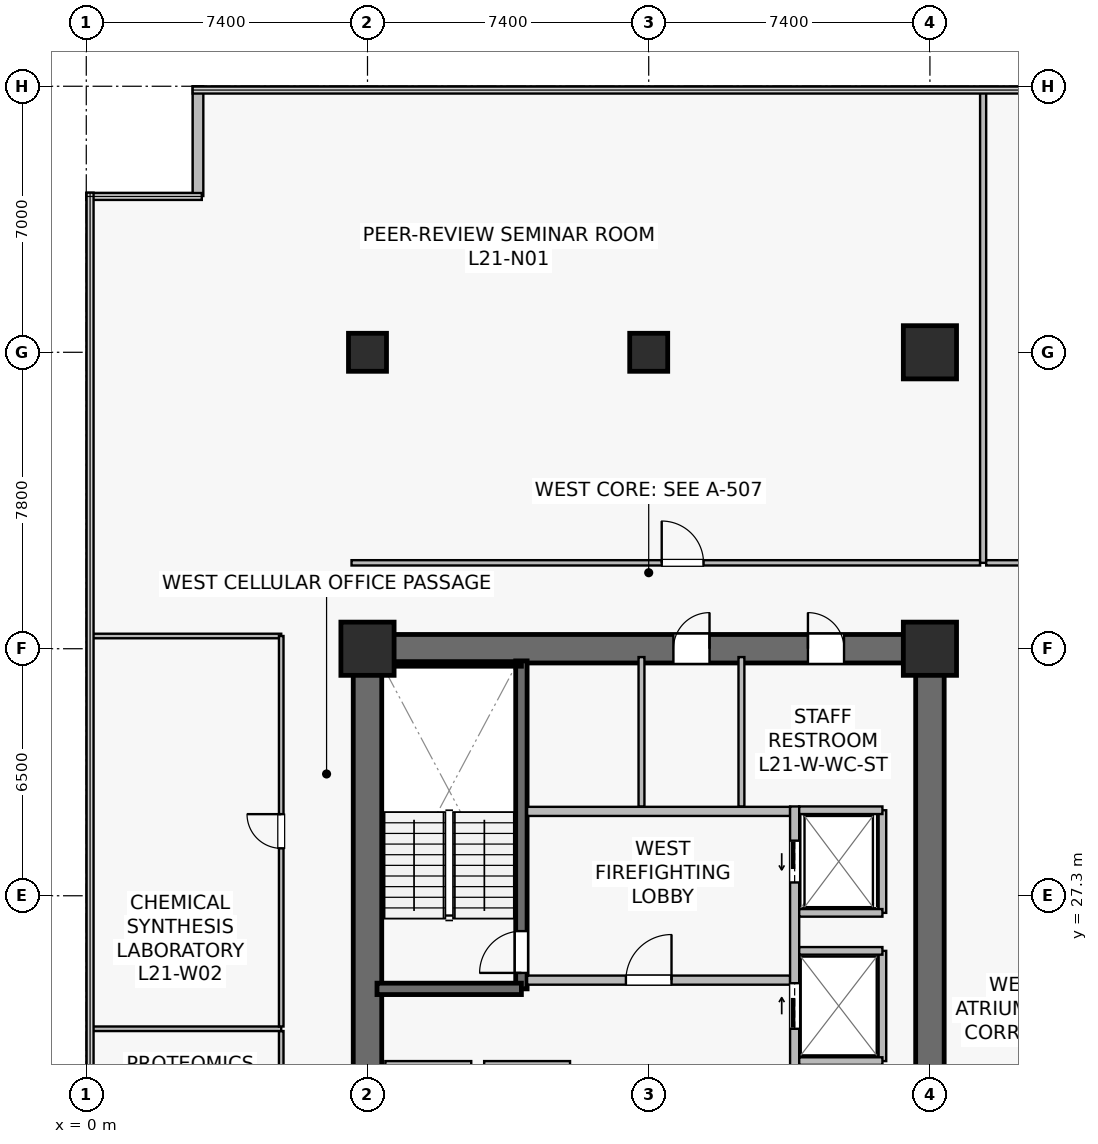
"""IFC4 building model, lengths in metres.
Left out: names, types, materials, properties, quantities, classifications, styles, units other than length and angle.
Written with IfcOpenShell. Run it as: python <this file> out.ifc"""

import sys

from ifc_helpers import new_model, si_unit, direction, frame, frame_2d, origin, origin_2d, place, context, subcontext, project, spatial, rectangle, extrude, source, transform, mapped, element, fill, save


model = new_model("IFC4")
c1 = context("Model", 3, precision=1e-05, world=origin(), true_north=direction((0.0, 1.0)))
c2 = subcontext(c1, "Body", "Model", "MODEL_VIEW")
j1 = project(units=[si_unit("LENGTHUNIT", "METRE"), si_unit("PLANEANGLEUNIT", "RADIAN")], contexts=[c1])
p1 = place(None, origin())
s1 = spatial("IfcSite", under=j1, at=p1, CompositionType="ELEMENT")
p2 = place(p1, origin())
s2 = spatial("IfcBuilding", under=s1, at=p2, CompositionType="ELEMENT")
p3 = place(p2, frame((0.0, 0.0, 86.7)))
s3 = spatial("IfcBuildingStorey", under=s2, at=p3, CompositionType="ELEMENT", Elevation=86.7)
p4 = place(p3, frame((7.025, 33.8, 0.0), z_axis=(0.0, 0.0, 1.0), x_axis=(1.0, 0.0, 0.0)))
e1 = element("IfcWall", 1, at=p4, inside=s3, PredefinedType="SHEAR", context=c2, shape_type="SweptSolid", body=[
    extrude(rectangle(XDim=15.55, YDim=0.75, at=frame_2d((7.775, 0.0))), origin(), (0.0, 0.0, 1.0), 3.78),
])
p5 = place(p4, frame((8.425, 0.0, 0.0)))
e2 = element("IfcOpeningElement", 2, at=p5, cuts=e1, PredefinedType="OPENING", context=c2, shape_type="SweptSolid", body=[
    extrude(rectangle(XDim=0.95, YDim=2.15, at=frame_2d((0.475, 1.075))), frame((0.0, 0.385, 0.0), z_axis=(0.0, -1.0, 0.0), x_axis=(1.0, 0.0, 0.0)), (0.0, 0.0, 1.0), 0.77),
])
p6 = place(p4, frame((11.965, 0.0, 0.0)))
e3 = element("IfcOpeningElement", 3, at=p6, cuts=e1, PredefinedType="OPENING", context=c2, shape_type="SweptSolid", body=[
    extrude(rectangle(XDim=0.95, YDim=2.15, at=frame_2d((0.475, 1.075))), frame((0.0, 0.385, 0.0), z_axis=(0.0, -1.0, 0.0), x_axis=(1.0, 0.0, 0.0)), (0.0, 0.0, 1.0), 0.77),
])
p7 = place(p3, frame((7.4, 15.175, 0.0), z_axis=(0.0, 0.0, 1.0), x_axis=(0.0, 1.0, 0.0)))
e4 = element("IfcWall", 4, at=p7, inside=s3, PredefinedType="SHEAR", context=c2, shape_type="SweptSolid", body=[
    extrude(rectangle(XDim=18.25, YDim=0.75, at=frame_2d((9.125, 0.0))), origin(), (0.0, 0.0, 1.0), 3.78),
])
p8 = place(p3, frame((22.2, 15.175, 0.0), z_axis=(0.0, 0.0, 1.0), x_axis=(0.0, 1.0, 0.0)))
e5 = element("IfcWall", 5, at=p8, inside=s3, PredefinedType="SHEAR", context=c2, shape_type="SweptSolid", body=[
    extrude(rectangle(XDim=18.25, YDim=0.75, at=frame_2d((9.125, 0.0))), origin(), (0.0, 0.0, 1.0), 3.78),
])
p9 = place(p8, frame((3.375, 0.0, 0.0)))
e6 = element("IfcOpeningElement", 6, at=p9, cuts=e5, PredefinedType="OPENING", context=c2, shape_type="SweptSolid", body=[
    extrude(rectangle(XDim=1.42, YDim=2.2, at=frame_2d((0.71, 1.1))), frame((0.0, 0.385, 0.0), z_axis=(0.0, -1.0, 0.0), x_axis=(1.0, 0.0, 0.0)), (0.0, 0.0, 1.0), 0.77),
])
p10 = place(p3, frame((11.45, 24.85, 0.0), z_axis=(0.0, 0.0, 1.0), x_axis=(0.0, 1.0, 0.0)))
e7 = element("IfcWall", 7, at=p10, inside=s3, PredefinedType="SHEAR", context=c2, shape_type="SweptSolid", body=[
    extrude(rectangle(XDim=8.63, YDim=0.3, at=frame_2d((4.315, 0.0))), origin(), (0.0, 0.0, 1.0), 3.78),
])
p11 = place(p10, frame((0.42, 0.0, 0.0)))
e8 = element("IfcOpeningElement", 8, at=p11, cuts=e7, PredefinedType="OPENING", context=c2, shape_type="SweptSolid", body=[
    extrude(rectangle(XDim=1.1, YDim=2.15, at=frame_2d((0.55, 1.075))), frame((0.0, 0.16, 0.0), z_axis=(0.0, -1.0, 0.0), x_axis=(1.0, 0.0, 0.0)), (0.0, 0.0, 1.0), 0.32),
])
p12 = place(p3, frame((7.65, 24.85, 0.0), z_axis=(0.0, 0.0, 1.0), x_axis=(1.0, 0.0, 0.0)))
e9 = element("IfcWall", 9, at=p12, inside=s3, PredefinedType="SHEAR", context=c2, shape_type="SweptSolid", body=[
    extrude(rectangle(XDim=3.8, YDim=0.3, at=frame_2d((1.9, 0.0))), origin(), (0.0, 0.0, 1.0), 3.78),
])
p13 = place(p3, frame((7.73, 33.4, 0.0), z_axis=(0.0, 0.0, 1.0), x_axis=(1.0, 0.0, 0.0)))
e10 = element("IfcWall", 10, at=p13, inside=s3, PredefinedType="SOLIDWALL", context=c2, shape_type="SweptSolid", body=[
    extrude(rectangle(XDim=3.72, YDim=0.12, at=frame_2d((1.86, 0.0))), origin(), (0.0, 0.0, 1.0), 3.78),
])
m1 = source(origin(), c2, "Body", "SweptSolid", [
    extrude(rectangle(XDim=1.4, YDim=1.4, at=origin_2d()), origin(), (0.0, 0.0, 1.0), 4.1),
])
for number, where, z_axis, x_axis in (
    (11, (7.4, 33.8, 0.0), (0.0, 0.0, 1.0), (1.0, 0.0, 0.0)),
    (12, (22.2, 33.8, 0.0), (0.0, 0.0, 1.0), (1.0, 0.0, 0.0)),
):
    element("IfcColumn", number, at=place(p3, frame(where, z_axis=z_axis, x_axis=x_axis)), inside=s3, PredefinedType="COLUMN", context=c2, shape_type="MappedRepresentation", body=[
        mapped(m1, transform((0.0, 0.0, 0.0), scale=1.0)),
    ])
m2 = source(origin(), c2, "Body", "SweptSolid", [
    extrude(rectangle(XDim=1.0, YDim=1.0, at=origin_2d()), origin(), (0.0, 0.0, 1.0), 4.1),
])
p14 = place(p3, frame((14.8, 41.6, 0.0), z_axis=(0.0, 0.0, 1.0), x_axis=(1.0, 0.0, 0.0)))
e13 = element("IfcColumn", 13, at=p14, inside=s3, PredefinedType="COLUMN", context=c2, shape_type="MappedRepresentation", body=[
    mapped(m2, transform((0.0, 0.0, 0.0), scale=1.0)),
])
p15 = place(p3, frame((22.2, 41.6, 0.0), z_axis=(0.0, 0.0, 1.0), x_axis=(1.0, 0.0, 0.0)))
e14 = element("IfcColumn", 14, at=p15, inside=s3, PredefinedType="COLUMN", context=c2, shape_type="MappedRepresentation", body=[
    mapped(m1, transform((0.0, 0.0, 0.0), scale=1.0)),
])
p16 = place(p3, frame((7.4, 41.6, 0.0), z_axis=(0.0, 0.0, 1.0), x_axis=(1.0, 0.0, 0.0)))
e15 = element("IfcColumn", 15, at=p16, inside=s3, PredefinedType="COLUMN", context=c2, shape_type="MappedRepresentation", body=[
    mapped(m2, transform((0.0, 0.0, 0.0), scale=1.0)),
])
p17 = place(p3, frame((2.94, 48.6, 0.0), z_axis=(0.0, 0.0, 1.0), x_axis=(0.0, -1.0, 0.0)))
e16 = element("IfcWall", 16, at=p17, inside=s3, PredefinedType="STANDARD", context=c2, shape_type="SweptSolid", body=[
    extrude(rectangle(XDim=2.888, YDim=0.28, at=frame_2d((1.444, 0.0))), origin(), (0.0, 0.0, 1.0), 3.78),
])
p18 = place(p3, frame((11.6, 25.08, 0.0), z_axis=(0.0, 0.0, 1.0), x_axis=(1.0, 0.0, 0.0)))
e17 = element("IfcWall", 17, at=p18, inside=s3, PredefinedType="SOLIDWALL", context=c2, shape_type="SweptSolid", body=[
    extrude(rectangle(XDim=6.92, YDim=0.24, at=frame_2d((3.46, 0.0))), origin(), (0.0, 0.0, 1.0), 3.115),
])
p19 = place(p18, frame((2.6, 0.0, 0.0)))
e18 = element("IfcOpeningElement", 18, at=p19, cuts=e17, PredefinedType="OPENING", context=c2, shape_type="SweptSolid", body=[
    extrude(rectangle(XDim=1.2, YDim=2.16, at=frame_2d((0.6, 1.08))), frame((0.0, 0.13, 0.0), z_axis=(0.0, -1.0, 0.0), x_axis=(1.0, 0.0, 0.0)), (0.0, 0.0, 1.0), 0.26),
])
p20 = place(p3, frame((11.6, 29.52, 0.0), z_axis=(0.0, 0.0, 1.0), x_axis=(1.0, 0.0, 0.0)))
e19 = element("IfcWall", 19, at=p20, inside=s3, PredefinedType="SOLIDWALL", context=c2, shape_type="SweptSolid", body=[
    extrude(rectangle(XDim=6.92, YDim=0.24, at=frame_2d((3.46, 0.0))), origin(), (0.0, 0.0, 1.0), 3.115),
])
p21 = place(p3, frame((18.64, 22.8, 0.0), z_axis=(0.0, 0.0, 1.0), x_axis=(0.0, 1.0, 0.0)))
e20 = element("IfcWall", 20, at=p21, inside=s3, PredefinedType="SOLIDWALL", context=c2, shape_type="SweptSolid", body=[
    extrude(rectangle(XDim=6.85, YDim=0.24, at=frame_2d((3.425, 0.0))), origin(), (0.0, 0.0, 1.0), 2.865),
])
p22 = place(p21, frame((4.85, 0.0, 0.0)))
e21 = element("IfcOpeningElement", 21, at=p22, cuts=e20, PredefinedType="OPENING", context=c2, shape_type="SweptSolid", body=[
    extrude(rectangle(XDim=1.1, YDim=2.22, at=frame_2d((0.55, 1.11))), frame((0.0, 0.13, 0.0), z_axis=(0.0, -1.0, 0.0), x_axis=(1.0, 0.0, 0.0)), (0.0, 0.0, 1.0), 0.26),
])
p23 = place(p21, frame((1.0, 0.0, 0.0)))
e22 = element("IfcOpeningElement", 22, at=p23, cuts=e20, PredefinedType="OPENING", context=c2, shape_type="SweptSolid", body=[
    extrude(rectangle(XDim=1.2, YDim=2.22, at=frame_2d((0.6, 1.11))), frame((0.0, 0.13, 0.0), z_axis=(0.0, -1.0, 0.0), x_axis=(1.0, 0.0, 0.0)), (0.0, 0.0, 1.0), 0.26),
])
p24 = place(p3, frame((7.87, 22.85, 0.0), z_axis=(0.0, 0.0, 1.0), x_axis=(1.0, 0.0, 0.0)))
e23 = element("IfcWall", 23, at=p24, inside=s3, PredefinedType="SOLIDWALL", context=c2, shape_type="SweptSolid", body=[
    extrude(rectangle(XDim=2.26, YDim=0.2, at=frame_2d((1.13, 0.0))), origin(), (0.0, 0.0, 1.0), 3.78),
])
p25 = place(p3, frame((10.47, 22.85, 0.0), z_axis=(0.0, 0.0, 1.0), x_axis=(1.0, 0.0, 0.0)))
e24 = element("IfcWall", 24, at=p25, inside=s3, PredefinedType="SOLIDWALL", context=c2, shape_type="SweptSolid", body=[
    extrude(rectangle(XDim=2.26, YDim=0.2, at=frame_2d((1.13, 0.0))), origin(), (0.0, 0.0, 1.0), 3.78),
])
p26 = place(p3, frame((20.95, 26.85, 0.0), z_axis=(0.0, 0.0, 1.0), x_axis=(0.0, 1.0, 0.0)))
e25 = element("IfcWall", 25, at=p26, inside=s3, PredefinedType="SOLIDWALL", context=c2, shape_type="SweptSolid", body=[
    extrude(rectangle(XDim=2.7, YDim=0.2, at=frame_2d((1.35, 0.0))), origin(), (0.0, 0.0, 1.0), 3.78),
])
p27 = place(p3, frame((18.76, 29.55, 0.0), z_axis=(0.0, 0.0, 1.0), x_axis=(1.0, 0.0, 0.0)))
e26 = element("IfcWall", 26, at=p27, inside=s3, PredefinedType="SOLIDWALL", context=c2, shape_type="SweptSolid", body=[
    extrude(rectangle(XDim=2.19, YDim=0.2, at=frame_2d((1.095, 0.0))), origin(), (0.0, 0.0, 1.0), 3.78),
])
p28 = place(p3, frame((18.76, 26.85, 0.0), z_axis=(0.0, 0.0, 1.0), x_axis=(1.0, 0.0, 0.0)))
e27 = element("IfcWall", 27, at=p28, inside=s3, PredefinedType="SOLIDWALL", context=c2, shape_type="SweptSolid", body=[
    extrude(rectangle(XDim=2.19, YDim=0.2, at=frame_2d((1.095, 0.0))), origin(), (0.0, 0.0, 1.0), 3.177),
])
p29 = place(p3, frame((20.95, 22.95, 0.0), z_axis=(0.0, 0.0, 1.0), x_axis=(0.0, 1.0, 0.0)))
e28 = element("IfcWall", 28, at=p29, inside=s3, PredefinedType="SOLIDWALL", context=c2, shape_type="SweptSolid", body=[
    extrude(rectangle(XDim=2.9, YDim=0.2, at=frame_2d((1.45, 0.0))), origin(), (0.0, 0.0, 1.0), 2.865),
])
for number, where, z_axis, x_axis in (
    (29, (18.76, 25.85, 0.0), (0.0, 0.0, 1.0), (1.0, 0.0, 0.0)),
    (30, (18.76, 22.95, 0.0), (0.0, 0.0, 1.0), (1.0, 0.0, 0.0)),
):
    element("IfcWall", number, at=place(p3, frame(where, z_axis=z_axis, x_axis=x_axis)), inside=s3, PredefinedType="SOLIDWALL", context=c2, shape_type="SweptSolid", body=[
        extrude(rectangle(XDim=2.19, YDim=0.2, at=frame_2d((1.095, 0.0))), origin(), (0.0, 0.0, 1.0), 3.78),
    ])
p30 = place(p3, frame((14.61, 29.65, 0.0), z_axis=(0.0, 0.0, 1.0), x_axis=(0.0, 1.0, 0.0)))
e31 = element("IfcWall", 31, at=p30, inside=s3, PredefinedType="PLUMBINGWALL", context=c2, shape_type="SweptSolid", body=[
    extrude(rectangle(XDim=3.93, YDim=0.155, at=frame_2d((1.965, 0.0))), origin(), (0.0, 0.0, 1.0), 3.115),
])
p31 = place(p3, frame((17.24, 29.65, 0.0), z_axis=(0.0, 0.0, 1.0), x_axis=(0.0, 1.0, 0.0)))
e32 = element("IfcWall", 32, at=p31, inside=s3, PredefinedType="PLUMBINGWALL", context=c2, shape_type="SweptSolid", body=[
    extrude(rectangle(XDim=3.93, YDim=0.155, at=frame_2d((1.965, 0.0))), origin(), (0.0, 0.0, 1.0), 3.78),
])
p32 = place(p3, frame((6.98, 36.06, 0.0), z_axis=(0.0, 0.0, 1.0), x_axis=(1.0, 0.0, 0.0)))
e33 = element("IfcWall", 33, at=p32, inside=s3, PredefinedType="PARTITIONING", context=c2, shape_type="SweptSolid", body=[
    extrude(rectangle(XDim=16.54, YDim=0.14, at=frame_2d((8.27, 0.0))), origin(), (0.0, 0.0, 1.0), 3.115),
])
p33 = place(p32, frame((8.162, 0.0, 0.0)))
e34 = element("IfcOpeningElement", 34, at=p33, cuts=e33, PredefinedType="OPENING", context=c2, shape_type="SweptSolid", body=[
    extrude(rectangle(XDim=1.1, YDim=2.18, at=frame_2d((0.55, 1.09))), frame((0.0, 0.08, 0.0), z_axis=(0.0, -1.0, 0.0), x_axis=(1.0, 0.0, 0.0)), (0.0, 0.0, 1.0), 0.16),
])
p34 = place(p3, frame((23.6, 36.06, 0.0), z_axis=(0.0, 0.0, 1.0), x_axis=(0.0, 1.0, 0.0)))
e35 = element("IfcWall", 35, at=p34, inside=s3, PredefinedType="PARTITIONING", context=c2, shape_type="SweptSolid", body=[
    extrude(rectangle(XDim=12.43, YDim=0.16, at=frame_2d((6.215, 0.0))), origin(), (0.0, 0.0, 1.0), 3.015),
])
p35 = place(p3, frame((23.68, 36.06, 0.0), z_axis=(0.0, 0.0, 1.0), x_axis=(1.0, 0.0, 0.0)))
e36 = element("IfcWall", 36, at=p35, inside=s3, PredefinedType="PARTITIONING", context=c2, shape_type="SweptSolid", body=[
    extrude(rectangle(XDim=23.64, YDim=0.14, at=frame_2d((11.82, 0.0))), origin(), (0.0, 0.0, 1.0), 3.115),
])
p36 = place(p35, frame((9.304, 0.0, 0.0)))
e37 = element("IfcOpeningElement", 37, at=p36, cuts=e36, PredefinedType="OPENING", context=c2, shape_type="SweptSolid", body=[
    extrude(rectangle(XDim=1.1, YDim=2.18, at=frame_2d((0.55, 1.09))), frame((0.0, 0.08, 0.0), z_axis=(0.0, -1.0, 0.0), x_axis=(1.0, 0.0, 0.0)), (0.0, 0.0, 1.0), 0.16),
])
p37 = place(p3, frame((0.11, 34.135, 0.0), z_axis=(0.0, 0.0, 1.0), x_axis=(1.0, 0.0, 0.0)))
e38 = element("IfcWall", 38, at=p37, inside=s3, PredefinedType="PARTITIONING", context=c2, shape_type="SweptSolid", body=[
    extrude(rectangle(XDim=5.02, YDim=0.12, at=frame_2d((2.51, 0.0))), origin(), (0.0, 0.0, 1.0), 3.78),
])
p38 = place(p3, frame((5.13, 14.465, 0.0), z_axis=(0.0, 0.0, 1.0), x_axis=(0.0, 1.0, 0.0)))
e39 = element("IfcWall", 39, at=p38, inside=s3, PredefinedType="PARTITIONING", context=c2, shape_type="SweptSolid", body=[
    extrude(rectangle(XDim=9.275, YDim=0.12, at=frame_2d((4.637, 0.0))), origin(), (0.0, 0.0, 1.0), 3.78),
])
p39 = place(p38, frame((4.188, 0.0, 0.0)))
e40 = element("IfcOpeningElement", 40, at=p39, cuts=e39, PredefinedType="OPENING", context=c2, shape_type="SweptSolid", body=[
    extrude(rectangle(XDim=0.9, YDim=2.1, at=frame_2d((0.45, 1.05))), frame((0.0, 0.07, 0.0), z_axis=(0.0, -1.0, 0.0), x_axis=(1.0, 0.0, 0.0)), (0.0, 0.0, 1.0), 0.14),
])
p40 = place(p3, frame((0.11, 23.8, 0.0), z_axis=(0.0, 0.0, 1.0), x_axis=(1.0, 0.0, 0.0)))
e41 = element("IfcWall", 41, at=p40, inside=s3, PredefinedType="PARTITIONING", context=c2, shape_type="SweptSolid", body=[
    extrude(rectangle(XDim=5.02, YDim=0.12, at=frame_2d((2.51, 0.0))), origin(), (0.0, 0.0, 1.0), 3.78),
])
p41 = place(p3, frame((5.13, 23.86, 0.0), z_axis=(0.0, 0.0, 1.0), x_axis=(0.0, 1.0, 0.0)))
e42 = element("IfcWall", 42, at=p41, inside=s3, PredefinedType="PARTITIONING", context=c2, shape_type="SweptSolid", body=[
    extrude(rectangle(XDim=10.275, YDim=0.12, at=frame_2d((5.137, 0.0))), origin(), (0.0, 0.0, 1.0), 3.78),
])
p42 = place(p41, frame((4.688, 0.0, 0.0)))
e43 = element("IfcOpeningElement", 43, at=p42, cuts=e42, PredefinedType="OPENING", context=c2, shape_type="SweptSolid", body=[
    extrude(rectangle(XDim=0.9, YDim=2.1, at=frame_2d((0.45, 1.05))), frame((0.0, 0.07, 0.0), z_axis=(0.0, -1.0, 0.0), x_axis=(1.0, 0.0, 0.0)), (0.0, 0.0, 1.0), 0.14),
])
m3 = source(origin(), c2, "Body", "SweptSolid", [
    extrude(rectangle(XDim=1.1, YDim=2.15, at=frame_2d((0.55, 1.075))), frame((0.0, 0.025, 0.0), z_axis=(0.0, -1.0, 0.0), x_axis=(1.0, 0.0, 0.0)), (0.0, 0.0, 1.0), 0.05),
])
p43 = place(p11, origin())
e44 = element("IfcDoor", 44, at=p43, inside=s3, OperationType="SINGLE_SWING_LEFT", PredefinedType="DOOR", context=c2, shape_type="MappedRepresentation", body=[
    mapped(m3, transform((0.0, 0.0, 0.0), scale=1.0)),
])
fill(e8, e44)
m4 = source(origin(), c2, "Body", "SweptSolid", [
    extrude(rectangle(XDim=1.2, YDim=2.16, at=frame_2d((0.6, 1.08))), frame((0.0, 0.025, 0.0), z_axis=(0.0, -1.0, 0.0), x_axis=(1.0, 0.0, 0.0)), (0.0, 0.0, 1.0), 0.05),
])
p44 = place(p19, origin())
e45 = element("IfcDoor", 45, at=p44, inside=s3, OperationType="SINGLE_SWING_RIGHT", PredefinedType="DOOR", context=c2, shape_type="MappedRepresentation", body=[
    mapped(m4, transform((0.0, 0.0, 0.0), scale=1.0)),
])
fill(e18, e45)
m5 = source(origin(), c2, "Body", "SweptSolid", [
    extrude(rectangle(XDim=1.1, YDim=2.22, at=frame_2d((0.55, 1.11))), frame((0.0, 0.025, 0.0), z_axis=(0.0, -1.0, 0.0), x_axis=(1.0, 0.0, 0.0)), (0.0, 0.0, 1.0), 0.05),
])
p45 = place(p22, origin())
e46 = element("IfcDoor", 46, at=p45, inside=s3, OperationType="SLIDING_TO_LEFT", PredefinedType="USERDEFINED", context=c2, shape_type="MappedRepresentation", body=[
    mapped(m5, transform((0.0, 0.0, 0.0), scale=1.0)),
])
fill(e21, e46)
m6 = source(origin(), c2, "Body", "SweptSolid", [
    extrude(rectangle(XDim=1.2, YDim=2.22, at=frame_2d((0.6, 1.11))), frame((0.0, 0.025, 0.0), z_axis=(0.0, -1.0, 0.0), x_axis=(1.0, 0.0, 0.0)), (0.0, 0.0, 1.0), 0.05),
])
p46 = place(p23, origin())
e47 = element("IfcDoor", 47, at=p46, inside=s3, OperationType="SLIDING_TO_RIGHT", PredefinedType="USERDEFINED", context=c2, shape_type="MappedRepresentation", body=[
    mapped(m6, transform((0.0, 0.0, 0.0), scale=1.0)),
])
fill(e22, e47)
m7 = source(origin(), c2, "Body", "SweptSolid", [
    extrude(rectangle(XDim=0.95, YDim=2.15, at=frame_2d((0.475, 1.075))), frame((0.0, 0.025, 0.0), z_axis=(0.0, -1.0, 0.0), x_axis=(1.0, 0.0, 0.0)), (0.0, 0.0, 1.0), 0.05),
])
p47 = place(p5, origin())
e48 = element("IfcDoor", 48, at=p47, inside=s3, OperationType="SINGLE_SWING_RIGHT", PredefinedType="DOOR", context=c2, shape_type="MappedRepresentation", body=[
    mapped(m7, transform((0.0, 0.0, 0.0), scale=1.0)),
])
fill(e2, e48)
p48 = place(p6, origin())
e49 = element("IfcDoor", 49, at=p48, inside=s3, OperationType="SINGLE_SWING_LEFT", PredefinedType="DOOR", context=c2, shape_type="MappedRepresentation", body=[
    mapped(m7, transform((0.0, 0.0, 0.0), scale=1.0)),
])
fill(e3, e49)
m8 = source(origin(), c2, "Body", "SweptSolid", [
    extrude(rectangle(XDim=1.1, YDim=2.18, at=frame_2d((0.55, 1.09))), frame((0.0, 0.025, 0.0), z_axis=(0.0, -1.0, 0.0), x_axis=(1.0, 0.0, 0.0)), (0.0, 0.0, 1.0), 0.05),
])
p49 = place(p33, origin())
e50 = element("IfcDoor", 50, at=p49, inside=s3, OperationType="SINGLE_SWING_LEFT", PredefinedType="DOOR", context=c2, shape_type="MappedRepresentation", body=[
    mapped(m8, transform((0.0, 0.0, 0.0), scale=1.0)),
])
fill(e34, e50)
m9 = source(origin(), c2, "Body", "SweptSolid", [
    extrude(rectangle(XDim=0.9, YDim=2.1, at=frame_2d((0.45, 1.05))), frame((0.0, 0.025, 0.0), z_axis=(0.0, -1.0, 0.0), x_axis=(1.0, 0.0, 0.0)), (0.0, 0.0, 1.0), 0.05),
])
p50 = place(p42, origin())
e51 = element("IfcDoor", 51, at=p50, inside=s3, OperationType="SINGLE_SWING_RIGHT", PredefinedType="DOOR", context=c2, shape_type="MappedRepresentation", body=[
    mapped(m9, transform((0.0, 0.0, 0.0), scale=1.0)),
])
fill(e43, e51)
save(model, sys.argv[1])
